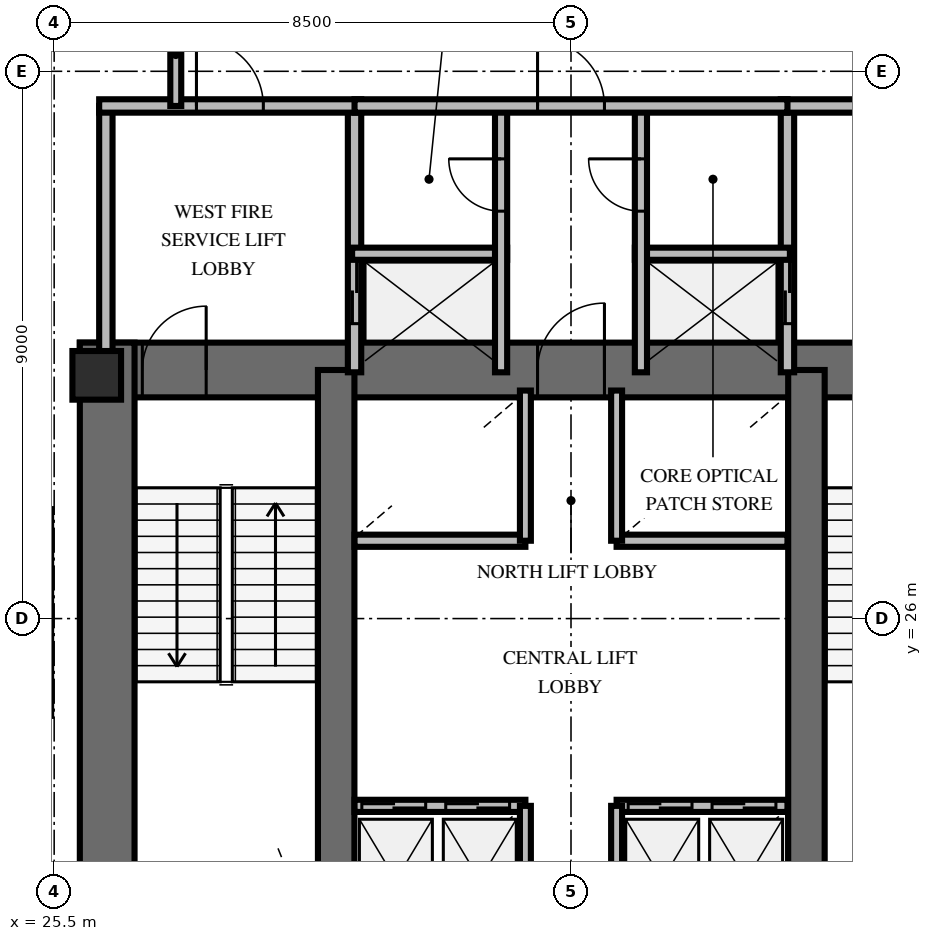
"""IFC4 building model, lengths in metres.
Left out: names, types, materials, properties, quantities, classifications, styles, units other than length and angle.
Written with IfcOpenShell. Run it as: python <this file> out.ifc"""

import sys

from ifc_helpers import new_model, si_unit, direction, frame, frame_2d, origin, origin_2d, place, context, subcontext, project, spatial, rectangle, extrude, element, fill, save


model = new_model("IFC4")
c1 = context("Model", 3, precision=1e-05, world=origin(), true_north=direction((0.0, 1.0)))
c2 = subcontext(c1, "Body", "Model", "MODEL_VIEW")
j1 = project(units=[si_unit("LENGTHUNIT", "METRE"), si_unit("PLANEANGLEUNIT", "RADIAN")], contexts=[c1])
p1 = place(None, origin())
s1 = spatial("IfcSite", under=j1, at=p1, CompositionType="ELEMENT")
p2 = place(p1, origin())
s2 = spatial("IfcBuilding", under=s1, at=p2, CompositionType="ELEMENT")
p3 = place(p2, frame((0.0, 0.0, 63.6)))
s3 = spatial("IfcBuildingStorey", under=s2, at=p3, CompositionType="ELEMENT", Elevation=63.6)
p4 = place(p3, frame((25.922, 30.088, 0.0), z_axis=(0.0, 0.0, 1.0), x_axis=(1.0, 0.0, 0.0)))
e1 = element("IfcWall", 1, at=p4, inside=s3, PredefinedType="SHEAR", context=c2, shape_type="SweptSolid", body=[
    extrude(rectangle(XDim=16.166, YDim=0.9, at=frame_2d((8.083, 0.0))), origin(), (0.0, 0.0, 1.0), 4.2),
])
p5 = place(p4, frame((1.028, 0.0, 0.0)))
e2 = element("IfcOpeningElement", 2, at=p5, cuts=e1, PredefinedType="OPENING", context=c2, shape_type="SweptSolid", body=[
    extrude(rectangle(XDim=1.05, YDim=2.15, at=frame_2d((0.525, 1.075))), frame((0.0, 0.46, 0.0), z_axis=(0.0, -1.0, 0.0), x_axis=(1.0, 0.0, 0.0)), (0.0, 0.0, 1.0), 0.92),
])
p6 = place(p4, frame((14.078, 0.0, 0.0)))
e3 = element("IfcOpeningElement", 3, at=p6, cuts=e1, PredefinedType="OPENING", context=c2, shape_type="SweptSolid", body=[
    extrude(rectangle(XDim=1.05, YDim=2.15, at=frame_2d((0.525, 1.075))), frame((0.0, 0.46, 0.0), z_axis=(0.0, -1.0, 0.0), x_axis=(1.0, 0.0, 0.0)), (0.0, 0.0, 1.0), 0.92),
])
p7 = place(p4, frame((7.528, 0.0, 0.0)))
e4 = element("IfcOpeningElement", 4, at=p7, cuts=e1, PredefinedType="OPENING", context=c2, shape_type="SweptSolid", body=[
    extrude(rectangle(XDim=1.1, YDim=2.15, at=frame_2d((0.55, 1.075))), frame((0.0, 0.46, 0.0), z_axis=(0.0, -1.0, 0.0), x_axis=(1.0, 0.0, 0.0)), (0.0, 0.0, 1.0), 0.92),
])
p8 = place(p3, frame((26.372, 19.662, 0.0), z_axis=(0.0, 0.0, 1.0), x_axis=(0.0, 1.0, 0.0)))
e5 = element("IfcWall", 5, at=p8, inside=s3, PredefinedType="SHEAR", context=c2, shape_type="SweptSolid", body=[
    extrude(rectangle(XDim=10.876, YDim=0.9, at=frame_2d((5.438, 0.0))), origin(), (0.0, 0.0, 1.0), 4.2),
])
for number, where, z_axis, x_axis in (
    (6, (30.138, 20.112, 0.0), (0.0, 0.0, 1.0), (0.0, 1.0, 0.0)),
    (7, (37.872, 20.112, 0.0), (0.0, 0.0, 1.0), (0.0, 1.0, 0.0)),
):
    element("IfcWall", number, at=place(p3, frame(where, z_axis=z_axis, x_axis=x_axis)), inside=s3, PredefinedType="SHEAR", context=c2, shape_type="SweptSolid", body=[
        extrude(rectangle(XDim=9.976, YDim=0.6, at=frame_2d((4.988, 0.0))), origin(), (0.0, 0.0, 1.0), 4.2),
    ])
p9 = place(p3, frame((26.2, 30.0, 0.0), z_axis=(0.0, 0.0, 1.0), x_axis=(1.0, 0.0, 0.0)))
e8 = element("IfcColumn", 8, at=p9, inside=s3, PredefinedType="PILASTER", context=c2, shape_type="SweptSolid", body=[
    extrude(rectangle(XDim=0.8, YDim=0.8, at=origin_2d()), origin(), (0.0, 0.0, 1.0), 4.2),
])
p10 = place(p3, frame((26.35, 30.05, 0.0), z_axis=(0.0, 0.0, 1.0), x_axis=(0.0, 1.0, 0.0)))
e9 = element("IfcWall", 9, at=p10, inside=s3, PredefinedType="SOLIDWALL", context=c2, shape_type="SweptSolid", body=[
    extrude(rectangle(XDim=4.38, YDim=0.22, at=frame_2d((2.19, 0.0))), origin(), (0.0, 0.0, 1.0), 3.0),
])
p11 = place(p3, frame((30.44, 30.05, 0.0), z_axis=(0.0, 0.0, 1.0), x_axis=(0.0, 1.0, 0.0)))
e10 = element("IfcWall", 10, at=p11, inside=s3, PredefinedType="SOLIDWALL", context=c2, shape_type="SweptSolid", body=[
    extrude(rectangle(XDim=4.38, YDim=0.22, at=frame_2d((2.19, 0.0))), origin(), (0.0, 0.0, 1.0), 3.0),
])
p12 = place(p11, frame((0.8, 0.0, 0.0)))
e11 = element("IfcOpeningElement", 11, at=p12, cuts=e10, PredefinedType="OPENING", context=c2, shape_type="SweptSolid", body=[
    extrude(rectangle(XDim=1.05, YDim=2.1, at=frame_2d((0.525, 1.05))), frame((0.0, 0.12, 0.0), z_axis=(0.0, -1.0, 0.0), x_axis=(1.0, 0.0, 0.0)), (0.0, 0.0, 1.0), 0.24),
])
p13 = place(p3, frame((26.24, 34.43, 0.0), z_axis=(0.0, 0.0, 1.0), x_axis=(1.0, 0.0, 0.0)))
e12 = element("IfcWall", 12, at=p13, inside=s3, PredefinedType="SOLIDWALL", context=c2, shape_type="SweptSolid", body=[
    extrude(rectangle(XDim=4.31, YDim=0.22, at=frame_2d((2.155, 0.0))), origin(), (0.0, 0.0, 1.0), 3.0),
])
p14 = place(p13, frame((1.6, 0.0, 0.0)))
e13 = element("IfcOpeningElement", 13, at=p14, cuts=e12, PredefinedType="OPENING", context=c2, shape_type="SweptSolid", body=[
    extrude(rectangle(XDim=1.1, YDim=2.15, at=frame_2d((0.55, 1.075))), frame((0.0, 0.12, 0.0), z_axis=(0.0, -1.0, 0.0), x_axis=(1.0, 0.0, 0.0)), (0.0, 0.0, 1.0), 0.24),
])
p15 = place(p3, frame((30.4, 32.0, 0.0), z_axis=(0.0, 0.0, 1.0), x_axis=(1.0, 0.0, 0.0)))
e14 = element("IfcWall", 14, at=p15, inside=s3, PredefinedType="SOLIDWALL", context=c2, shape_type="SweptSolid", body=[
    extrude(rectangle(XDim=2.55, YDim=0.2, at=frame_2d((1.275, 0.0))), origin(), (0.0, 0.0, 1.0), 3.0),
])
p16 = place(p3, frame((32.85, 30.05, 0.0), z_axis=(0.0, 0.0, 1.0), x_axis=(0.0, 1.0, 0.0)))
e15 = element("IfcWall", 15, at=p16, inside=s3, PredefinedType="SOLIDWALL", context=c2, shape_type="SweptSolid", body=[
    extrude(rectangle(XDim=4.38, YDim=0.2, at=frame_2d((2.19, 0.0))), origin(), (0.0, 0.0, 1.0), 3.0),
])
p17 = place(p16, frame((2.65, 0.0, 0.0)))
e16 = element("IfcOpeningElement", 16, at=p17, cuts=e15, PredefinedType="OPENING", context=c2, shape_type="SweptSolid", body=[
    extrude(rectangle(XDim=0.86, YDim=2.05, at=frame_2d((0.43, 1.025))), frame((0.0, 0.11, 0.0), z_axis=(0.0, -1.0, 0.0), x_axis=(1.0, 0.0, 0.0)), (0.0, 0.0, 1.0), 0.22),
])
p18 = place(p3, frame((37.56, 30.05, 0.0), z_axis=(0.0, 0.0, 1.0), x_axis=(0.0, 1.0, 0.0)))
e17 = element("IfcWall", 17, at=p18, inside=s3, PredefinedType="SOLIDWALL", context=c2, shape_type="SweptSolid", body=[
    extrude(rectangle(XDim=4.38, YDim=0.22, at=frame_2d((2.19, 0.0))), origin(), (0.0, 0.0, 1.0), 3.0),
])
p19 = place(p18, frame((0.8, 0.0, 0.0)))
e18 = element("IfcOpeningElement", 18, at=p19, cuts=e17, PredefinedType="OPENING", context=c2, shape_type="SweptSolid", body=[
    extrude(rectangle(XDim=1.05, YDim=2.1, at=frame_2d((0.525, 1.05))), frame((0.0, 0.12, 0.0), z_axis=(0.0, -1.0, 0.0), x_axis=(1.0, 0.0, 0.0)), (0.0, 0.0, 1.0), 0.24),
])
p20 = place(p3, frame((37.45, 34.43, 0.0), z_axis=(0.0, 0.0, 1.0), x_axis=(1.0, 0.0, 0.0)))
e19 = element("IfcWall", 19, at=p20, inside=s3, PredefinedType="SOLIDWALL", context=c2, shape_type="SweptSolid", body=[
    extrude(rectangle(XDim=4.31, YDim=0.22, at=frame_2d((2.155, 0.0))), origin(), (0.0, 0.0, 1.0), 3.0),
])
p21 = place(p20, frame((1.6, 0.0, 0.0)))
e20 = element("IfcOpeningElement", 20, at=p21, cuts=e19, PredefinedType="OPENING", context=c2, shape_type="SweptSolid", body=[
    extrude(rectangle(XDim=1.1, YDim=2.15, at=frame_2d((0.55, 1.075))), frame((0.0, 0.12, 0.0), z_axis=(0.0, -1.0, 0.0), x_axis=(1.0, 0.0, 0.0)), (0.0, 0.0, 1.0), 0.24),
])
p22 = place(p3, frame((35.05, 32.0, 0.0), z_axis=(0.0, 0.0, 1.0), x_axis=(1.0, 0.0, 0.0)))
e21 = element("IfcWall", 21, at=p22, inside=s3, PredefinedType="SOLIDWALL", context=c2, shape_type="SweptSolid", body=[
    extrude(rectangle(XDim=2.55, YDim=0.2, at=frame_2d((1.275, 0.0))), origin(), (0.0, 0.0, 1.0), 3.0),
])
p23 = place(p3, frame((35.15, 30.05, 0.0), z_axis=(0.0, 0.0, 1.0), x_axis=(0.0, 1.0, 0.0)))
e22 = element("IfcWall", 22, at=p23, inside=s3, PredefinedType="SOLIDWALL", context=c2, shape_type="SweptSolid", body=[
    extrude(rectangle(XDim=4.38, YDim=0.2, at=frame_2d((2.19, 0.0))), origin(), (0.0, 0.0, 1.0), 3.0),
])
p24 = place(p23, frame((2.65, 0.0, 0.0)))
e23 = element("IfcOpeningElement", 23, at=p24, cuts=e22, PredefinedType="OPENING", context=c2, shape_type="SweptSolid", body=[
    extrude(rectangle(XDim=0.86, YDim=2.05, at=frame_2d((0.43, 1.025))), frame((0.0, 0.11, 0.0), z_axis=(0.0, -1.0, 0.0), x_axis=(1.0, 0.0, 0.0)), (0.0, 0.0, 1.0), 0.22),
])
p25 = place(p3, frame((30.44, 34.43, 0.0), z_axis=(0.0, 0.0, 1.0), x_axis=(1.0, 0.0, 0.0)))
e24 = element("IfcWall", 24, at=p25, inside=s3, PredefinedType="SOLIDWALL", context=c2, shape_type="SweptSolid", body=[
    extrude(rectangle(XDim=7.12, YDim=0.22, at=frame_2d((3.56, 0.0))), origin(), (0.0, 0.0, 1.0), 3.0),
])
p26 = place(p25, frame((3.01, 0.0, 0.0)))
e25 = element("IfcOpeningElement", 25, at=p26, cuts=e24, PredefinedType="OPENING", context=c2, shape_type="SweptSolid", body=[
    extrude(rectangle(XDim=1.1, YDim=2.15, at=frame_2d((0.55, 1.075))), frame((0.0, 0.12, 0.0), z_axis=(0.0, -1.0, 0.0), x_axis=(1.0, 0.0, 0.0)), (0.0, 0.0, 1.0), 0.24),
])
p27 = place(p3, frame((30.44, 22.92, 0.0), z_axis=(0.0, 0.0, 1.0), x_axis=(1.0, 0.0, 0.0)))
e26 = element("IfcWall", 26, at=p27, inside=s3, PredefinedType="SOLIDWALL", context=c2, shape_type="SweptSolid", body=[
    extrude(rectangle(XDim=2.81, YDim=0.2, at=frame_2d((1.405, 0.0))), origin(), (0.0, 0.0, 1.0), 3.0),
])
p28 = place(p27, frame((0.12, 0.0, 0.0)))
e27 = element("IfcOpeningElement", 27, at=p28, cuts=e26, PredefinedType="OPENING", context=c2, shape_type="SweptSolid", body=[
    extrude(rectangle(XDim=1.05, YDim=2.1, at=frame_2d((0.525, 1.05))), frame((0.0, 0.11, 0.0), z_axis=(0.0, -1.0, 0.0), x_axis=(1.0, 0.0, 0.0)), (0.0, 0.0, 1.0), 0.22),
])
p29 = place(p27, frame((1.5, 0.0, 0.0)))
e28 = element("IfcOpeningElement", 28, at=p29, cuts=e26, PredefinedType="OPENING", context=c2, shape_type="SweptSolid", body=[
    extrude(rectangle(XDim=1.05, YDim=2.1, at=frame_2d((0.525, 1.05))), frame((0.0, 0.11, 0.0), z_axis=(0.0, -1.0, 0.0), x_axis=(1.0, 0.0, 0.0)), (0.0, 0.0, 1.0), 0.22),
])
p30 = place(p3, frame((33.25, 20.5, 0.0), z_axis=(0.0, 0.0, 1.0), x_axis=(0.0, 1.0, 0.0)))
e29 = element("IfcWall", 29, at=p30, inside=s3, PredefinedType="SOLIDWALL", context=c2, shape_type="SweptSolid", body=[
    extrude(rectangle(XDim=2.42, YDim=0.18, at=frame_2d((1.21, 0.0))), origin(), (0.0, 0.0, 1.0), 3.0),
])
p31 = place(p3, frame((34.75, 22.92, 0.0), z_axis=(0.0, 0.0, 1.0), x_axis=(1.0, 0.0, 0.0)))
e30 = element("IfcWall", 30, at=p31, inside=s3, PredefinedType="SOLIDWALL", context=c2, shape_type="SweptSolid", body=[
    extrude(rectangle(XDim=2.81, YDim=0.2, at=frame_2d((1.405, 0.0))), origin(), (0.0, 0.0, 1.0), 3.0),
])
p32 = place(p31, frame((0.19, 0.0, 0.0)))
e31 = element("IfcOpeningElement", 31, at=p32, cuts=e30, PredefinedType="OPENING", context=c2, shape_type="SweptSolid", body=[
    extrude(rectangle(XDim=1.05, YDim=2.1, at=frame_2d((0.525, 1.05))), frame((0.0, 0.11, 0.0), z_axis=(0.0, -1.0, 0.0), x_axis=(1.0, 0.0, 0.0)), (0.0, 0.0, 1.0), 0.22),
])
p33 = place(p31, frame((1.57, 0.0, 0.0)))
e32 = element("IfcOpeningElement", 32, at=p33, cuts=e30, PredefinedType="OPENING", context=c2, shape_type="SweptSolid", body=[
    extrude(rectangle(XDim=1.05, YDim=2.1, at=frame_2d((0.525, 1.05))), frame((0.0, 0.11, 0.0), z_axis=(0.0, -1.0, 0.0), x_axis=(1.0, 0.0, 0.0)), (0.0, 0.0, 1.0), 0.22),
])
p34 = place(p3, frame((34.75, 20.5, 0.0), z_axis=(0.0, 0.0, 1.0), x_axis=(0.0, 1.0, 0.0)))
e33 = element("IfcWall", 33, at=p34, inside=s3, PredefinedType="SOLIDWALL", context=c2, shape_type="SweptSolid", body=[
    extrude(rectangle(XDim=2.42, YDim=0.18, at=frame_2d((1.21, 0.0))), origin(), (0.0, 0.0, 1.0), 3.0),
])
p35 = place(p3, frame((30.44, 27.28, 0.0), z_axis=(0.0, 0.0, 1.0), x_axis=(1.0, 0.0, 0.0)))
e34 = element("IfcWall", 34, at=p35, inside=s3, PredefinedType="SOLIDWALL", context=c2, shape_type="SweptSolid", body=[
    extrude(rectangle(XDim=2.81, YDim=0.2, at=frame_2d((1.405, 0.0))), origin(), (0.0, 0.0, 1.0), 3.0),
])
p36 = place(p3, frame((33.25, 27.28, 0.0), z_axis=(0.0, 0.0, 1.0), x_axis=(0.0, 1.0, 0.0)))
e35 = element("IfcWall", 35, at=p36, inside=s3, PredefinedType="SOLIDWALL", context=c2, shape_type="SweptSolid", body=[
    extrude(rectangle(XDim=2.47, YDim=0.18, at=frame_2d((1.235, 0.0))), origin(), (0.0, 0.0, 1.0), 3.0),
])
p37 = place(p3, frame((34.75, 27.28, 0.0), z_axis=(0.0, 0.0, 1.0), x_axis=(1.0, 0.0, 0.0)))
e36 = element("IfcWall", 36, at=p37, inside=s3, PredefinedType="SOLIDWALL", context=c2, shape_type="SweptSolid", body=[
    extrude(rectangle(XDim=2.81, YDim=0.2, at=frame_2d((1.405, 0.0))), origin(), (0.0, 0.0, 1.0), 3.0),
])
p38 = place(p3, frame((34.75, 27.28, 0.0), z_axis=(0.0, 0.0, 1.0), x_axis=(0.0, 1.0, 0.0)))
e37 = element("IfcWall", 37, at=p38, inside=s3, PredefinedType="SOLIDWALL", context=c2, shape_type="SweptSolid", body=[
    extrude(rectangle(XDim=2.47, YDim=0.18, at=frame_2d((1.235, 0.0))), origin(), (0.0, 0.0, 1.0), 3.0),
])
p39 = place(p3, frame((27.5, 34.43, 0.0), z_axis=(0.0, 0.0, 1.0), x_axis=(0.0, 1.0, 0.0)))
e38 = element("IfcWall", 38, at=p39, inside=s3, PredefinedType="PARTITIONING", context=c2, shape_type="SweptSolid", body=[
    extrude(rectangle(XDim=1.693, YDim=0.18, at=frame_2d((0.846, 0.0))), origin(), (0.0, 0.0, 1.0), 3.0),
])
p40 = place(p3, frame((25.507, 37.029, 0.0), z_axis=(0.0, 0.0, 1.0), x_axis=(-0.674284930573, -0.738471280689, 0.0)))
e39 = element("IfcWall", 39, at=p40, inside=s3, PredefinedType="PARTITIONING", context=c2, shape_type="SweptSolid", body=[
    extrude(rectangle(XDim=4.834, YDim=0.18, at=frame_2d((2.417, 0.0))), origin(), (0.0, 0.0, 1.0), 3.0),
])
p41 = place(p5, origin())
e40 = element("IfcDoor", 40, at=p41, inside=s3, OperationType="SINGLE_SWING_RIGHT", PredefinedType="DOOR", context=c2, shape_type="SweptSolid", body=[
    extrude(rectangle(XDim=1.05, YDim=2.15, at=frame_2d((0.525, 1.075))), frame((0.0, 0.025, 0.0), z_axis=(0.0, -1.0, 0.0), x_axis=(1.0, 0.0, 0.0)), (0.0, 0.0, 1.0), 0.05),
])
fill(e2, e40)
p42 = place(p7, origin())
e41 = element("IfcDoor", 41, at=p42, inside=s3, OperationType="SINGLE_SWING_RIGHT", PredefinedType="DOOR", context=c2, shape_type="SweptSolid", body=[
    extrude(rectangle(XDim=1.1, YDim=2.15, at=frame_2d((0.55, 1.075))), frame((0.0, 0.025, 0.0), z_axis=(0.0, -1.0, 0.0), x_axis=(1.0, 0.0, 0.0)), (0.0, 0.0, 1.0), 0.05),
])
fill(e4, e41)
p43 = place(p14, origin())
e42 = element("IfcDoor", 42, at=p43, inside=s3, OperationType="SINGLE_SWING_LEFT", PredefinedType="DOOR", context=c2, shape_type="SweptSolid", body=[
    extrude(rectangle(XDim=1.1, YDim=2.15, at=frame_2d((0.55, 1.075))), frame((0.0, 0.025, 0.0), z_axis=(0.0, -1.0, 0.0), x_axis=(1.0, 0.0, 0.0)), (0.0, 0.0, 1.0), 0.05),
])
fill(e13, e42)
p44 = place(p12, origin())
e43 = element("IfcDoor", 43, at=p44, inside=s3, OperationType="DOUBLE_DOOR_SLIDING", PredefinedType="USERDEFINED", context=c2, shape_type="SweptSolid", body=[
    extrude(rectangle(XDim=1.05, YDim=2.1, at=frame_2d((0.525, 1.05))), frame((0.0, 0.025, 0.0), z_axis=(0.0, -1.0, 0.0), x_axis=(1.0, 0.0, 0.0)), (0.0, 0.0, 1.0), 0.05),
])
fill(e11, e43)
p45 = place(p17, origin())
e44 = element("IfcDoor", 44, at=p45, inside=s3, OperationType="SINGLE_SWING_RIGHT", PredefinedType="TRAPDOOR", context=c2, shape_type="SweptSolid", body=[
    extrude(rectangle(XDim=0.86, YDim=2.05, at=frame_2d((0.43, 1.025))), frame((0.0, 0.025, 0.0), z_axis=(0.0, -1.0, 0.0), x_axis=(1.0, 0.0, 0.0)), (0.0, 0.0, 1.0), 0.05),
])
fill(e16, e44)
p46 = place(p19, origin())
e45 = element("IfcDoor", 45, at=p46, inside=s3, OperationType="DOUBLE_DOOR_SLIDING", PredefinedType="USERDEFINED", context=c2, shape_type="SweptSolid", body=[
    extrude(rectangle(XDim=1.05, YDim=2.1, at=frame_2d((0.525, 1.05))), frame((0.0, 0.025, 0.0), z_axis=(0.0, -1.0, 0.0), x_axis=(1.0, 0.0, 0.0)), (0.0, 0.0, 1.0), 0.05),
])
fill(e18, e45)
p47 = place(p24, origin())
e46 = element("IfcDoor", 46, at=p47, inside=s3, OperationType="SINGLE_SWING_RIGHT", PredefinedType="TRAPDOOR", context=c2, shape_type="SweptSolid", body=[
    extrude(rectangle(XDim=0.86, YDim=2.05, at=frame_2d((0.43, 1.025))), frame((0.0, 0.025, 0.0), z_axis=(0.0, -1.0, 0.0), x_axis=(1.0, 0.0, 0.0)), (0.0, 0.0, 1.0), 0.05),
])
fill(e23, e46)
p48 = place(p26, origin())
e47 = element("IfcDoor", 47, at=p48, inside=s3, OperationType="SINGLE_SWING_LEFT", PredefinedType="DOOR", context=c2, shape_type="SweptSolid", body=[
    extrude(rectangle(XDim=1.1, YDim=2.15, at=frame_2d((0.55, 1.075))), frame((0.0, 0.025, 0.0), z_axis=(0.0, -1.0, 0.0), x_axis=(1.0, 0.0, 0.0)), (0.0, 0.0, 1.0), 0.05),
])
fill(e25, e47)
p49 = place(p28, origin())
e48 = element("IfcDoor", 48, at=p49, inside=s3, OperationType="DOUBLE_DOOR_SLIDING", PredefinedType="USERDEFINED", context=c2, shape_type="SweptSolid", body=[
    extrude(rectangle(XDim=1.05, YDim=2.1, at=frame_2d((0.525, 1.05))), frame((0.0, 0.025, 0.0), z_axis=(0.0, -1.0, 0.0), x_axis=(1.0, 0.0, 0.0)), (0.0, 0.0, 1.0), 0.05),
])
fill(e27, e48)
p50 = place(p29, origin())
e49 = element("IfcDoor", 49, at=p50, inside=s3, OperationType="DOUBLE_DOOR_SLIDING", PredefinedType="USERDEFINED", context=c2, shape_type="SweptSolid", body=[
    extrude(rectangle(XDim=1.05, YDim=2.1, at=frame_2d((0.525, 1.05))), frame((0.0, 0.025, 0.0), z_axis=(0.0, -1.0, 0.0), x_axis=(1.0, 0.0, 0.0)), (0.0, 0.0, 1.0), 0.05),
])
fill(e28, e49)
p51 = place(p32, origin())
e50 = element("IfcDoor", 50, at=p51, inside=s3, OperationType="DOUBLE_DOOR_SLIDING", PredefinedType="USERDEFINED", context=c2, shape_type="SweptSolid", body=[
    extrude(rectangle(XDim=1.05, YDim=2.1, at=frame_2d((0.525, 1.05))), frame((0.0, 0.025, 0.0), z_axis=(0.0, -1.0, 0.0), x_axis=(1.0, 0.0, 0.0)), (0.0, 0.0, 1.0), 0.05),
])
fill(e31, e50)
p52 = place(p33, origin())
e51 = element("IfcDoor", 51, at=p52, inside=s3, OperationType="DOUBLE_DOOR_SLIDING", PredefinedType="USERDEFINED", context=c2, shape_type="SweptSolid", body=[
    extrude(rectangle(XDim=1.05, YDim=2.1, at=frame_2d((0.525, 1.05))), frame((0.0, 0.025, 0.0), z_axis=(0.0, -1.0, 0.0), x_axis=(1.0, 0.0, 0.0)), (0.0, 0.0, 1.0), 0.05),
])
fill(e32, e51)
save(model, sys.argv[1])
